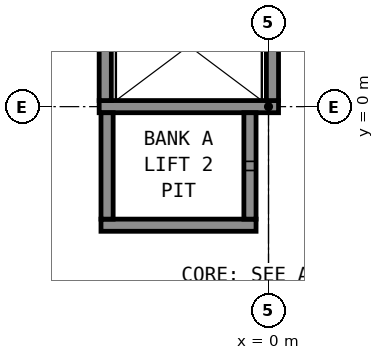
"""IFC4 building model, lengths in metres.
Left out: names, types, materials, properties, quantities, classifications, styles, units other than length and angle.
Written with IfcOpenShell. Run it as: python <this file> out.ifc"""

import sys

from ifc_helpers import new_model, si_unit, direction, frame, frame_2d, origin, place, context, subcontext, project, spatial, rectangle, extrude, element, save


model = new_model("IFC4")
c1 = context("Model", 3, precision=1e-05, world=origin(), true_north=direction((0.0, 1.0)))
c2 = subcontext(c1, "Body", "Model", "MODEL_VIEW")
j1 = project(units=[si_unit("LENGTHUNIT", "METRE"), si_unit("PLANEANGLEUNIT", "RADIAN")], contexts=[c1])
p1 = place(None, origin())
s1 = spatial("IfcSite", under=j1, at=p1, CompositionType="ELEMENT")
p2 = place(p1, origin())
s2 = spatial("IfcBuilding", under=s1, at=p2, CompositionType="ELEMENT")
p3 = place(p2, frame((0.0, 0.0, 32.0)))
s3 = spatial("IfcBuildingStorey", under=s2, at=p3, CompositionType="ELEMENT", Elevation=32.0)
p4 = place(p3, frame((-2.755, -1.95, 0.0), z_axis=(0.0, 0.0, 1.0), x_axis=(1.0, 0.0, 0.0)))
e1 = element("IfcWall", 1, at=p4, inside=s3, PredefinedType="PARTITIONING", context=c2, shape_type="SweptSolid", body=[
    extrude(rectangle(XDim=2.55, YDim=0.2, at=frame_2d((1.275, 0.0))), origin(), (0.0, 0.0, 1.0), 4.8),
])
p5 = place(p3, frame((-2.785, 0.0, 0.0), z_axis=(0.0, 0.0, 1.0), x_axis=(1.0, 0.0, 0.0)))
e2 = element("IfcWall", 2, at=p5, inside=s3, PredefinedType="PARTITIONING", context=c2, shape_type="SweptSolid", body=[
    extrude(rectangle(XDim=2.95, YDim=0.2, at=frame_2d((1.475, 0.0))), origin(), (0.0, 0.0, 1.0), 4.8),
])
p6 = place(p3, frame((0.065, 0.1, 0.0), z_axis=(0.0, 0.0, 1.0), x_axis=(0.0, 1.0, 0.0)))
e3 = element("IfcWall", 3, at=p6, inside=s3, PredefinedType="PARTITIONING", context=c2, shape_type="SweptSolid", body=[
    extrude(rectangle(XDim=1.95, YDim=0.2, at=frame_2d((0.975, 0.0))), origin(), (0.0, 0.0, 1.0), 4.8),
])
for number, where, z_axis, x_axis in (
    (4, (-0.305, -1.85, 0.0), (0.0, 0.0, 1.0), (0.0, 1.0, 0.0)),
    (5, (-2.655, -1.85, 0.0), (0.0, 0.0, 1.0), (0.0, 1.0, 0.0)),
):
    element("IfcWall", number, at=place(p3, frame(where, z_axis=z_axis, x_axis=x_axis)), inside=s3, PredefinedType="PARTITIONING", context=c2, shape_type="SweptSolid", body=[
        extrude(rectangle(XDim=1.75, YDim=0.2, at=frame_2d((0.875, 0.0))), origin(), (0.0, 0.0, 1.0), 4.8),
    ])
p7 = place(p3, frame((-2.685, 0.1, 0.0), z_axis=(0.0, 0.0, 1.0), x_axis=(0.0, 1.0, 0.0)))
e6 = element("IfcWall", 6, at=p7, inside=s3, PredefinedType="PARTITIONING", context=c2, shape_type="SweptSolid", body=[
    extrude(rectangle(XDim=1.95, YDim=0.2, at=frame_2d((0.975, 0.0))), origin(), (0.0, 0.0, 1.0), 4.8),
])
save(model, sys.argv[1])
